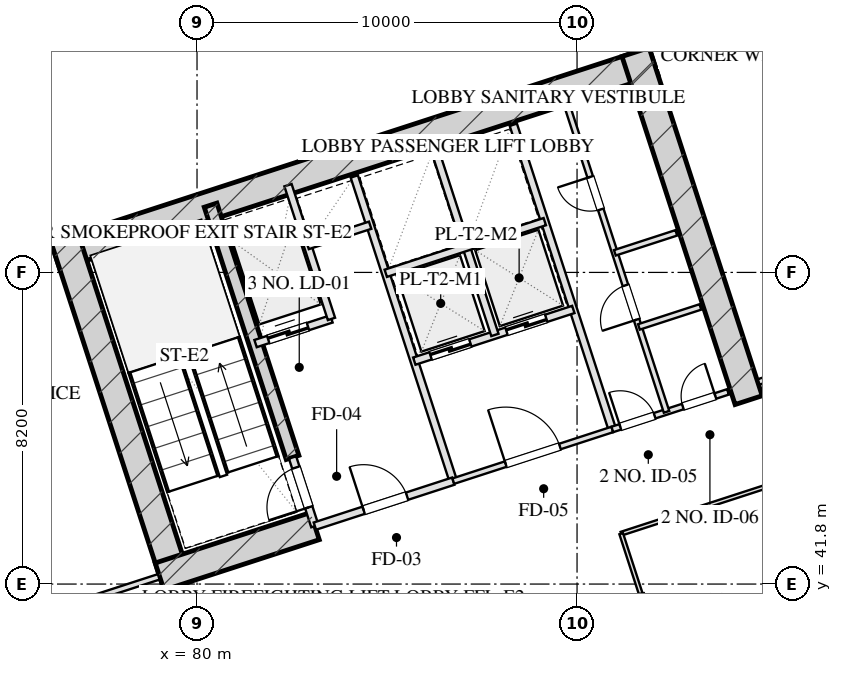
"""IFC4 building model, lengths in metres.
Left out: names, types, materials, properties, quantities, classifications, styles, units other than length and angle.
Written with IfcOpenShell. Run it as: python <this file> out.ifc"""

import sys

from ifc_helpers import new_model, si_unit, direction, frame, frame_2d, origin, place, context, subcontext, project, spatial, rectangle, extrude, element, fill, save


model = new_model("IFC4")
c1 = context("Model", 3, precision=1e-05, world=origin(), true_north=direction((0.0, 1.0)))
c2 = subcontext(c1, "Body", "Model", "MODEL_VIEW")
j1 = project(units=[si_unit("LENGTHUNIT", "METRE"), si_unit("PLANEANGLEUNIT", "RADIAN")], contexts=[c1])
p1 = place(None, origin())
s1 = spatial("IfcSite", under=j1, at=p1, CompositionType="ELEMENT")
p2 = place(p1, origin())
s2 = spatial("IfcBuilding", under=s1, at=p2, CompositionType="ELEMENT")
p3 = place(p2, frame((0.0, 0.0, 38.0)))
s3 = spatial("IfcBuildingStorey", under=s2, at=p3, CompositionType="ELEMENT", Elevation=38.0)
p4 = place(p3, frame((76.272, 50.443, 0.0), z_axis=(0.0, 0.0, 1.0), x_axis=(0.951056072937, 0.309018358888, 0.0)))
e1 = element("IfcWall", 1, at=p4, inside=s3, PredefinedType="SHEAR", context=c2, shape_type="SweptSolid", body=[
    extrude(rectangle(XDim=16.55, YDim=0.75, at=frame_2d((8.275, 0.0))), origin(), (0.0, 0.0, 1.0), 4.0),
])
for number, where, z_axis, x_axis in (
    (2, (79.489, 41.756, 0.0), (0.0, 0.0, 1.0), (-0.309, 0.951, 0.0)),
    (3, (94.515, 46.639, 0.0), (0.0, 0.0, 1.0), (-0.309, 0.951, 0.0)),
):
    element("IfcWall", number, at=place(p3, frame(where, z_axis=z_axis, x_axis=x_axis)), inside=s3, PredefinedType="SHEAR", context=c2, shape_type="SweptSolid", body=[
        extrude(rectangle(XDim=9.63, YDim=0.75, at=frame_2d((4.815, 0.0))), origin(), (0.0, 0.0, 1.0), 4.0),
    ])
p5 = place(p3, frame((82.514, 45.131, 0.0), z_axis=(0.0, 0.0, 1.0), x_axis=(-0.308988790936, 0.951065679686, 0.0)))
e4 = element("IfcWall", 4, at=p5, inside=s3, PredefinedType="SHEAR", context=c2, shape_type="SweptSolid", body=[
    extrude(rectangle(XDim=6.98, YDim=0.35, at=frame_2d((3.49, 0.0))), origin(), (0.0, 0.0, 1.0), 4.0),
])
p6 = place(p3, frame((79.016, 41.997, 0.0), z_axis=(0.0, 0.0, 1.0), x_axis=(0.95106038264, 0.309005094736, 0.0)))
e5 = element("IfcWall", 5, at=p6, inside=s3, PredefinedType="SHEAR", context=c2, shape_type="SweptSolid", body=[
    extrude(rectangle(XDim=4.295, YDim=0.75, at=frame_2d((2.147, 0.0))), origin(), (0.0, 0.0, 1.0), 4.0),
])
p7 = place(p3, frame((79.655, 4.352, 0.0), z_axis=(0.0, 0.0, 1.0), x_axis=(-0.309014526607, 0.951057318118, 0.0)))
e6 = element("IfcWall", 6, at=p7, inside=s3, PredefinedType="SOLIDWALL", context=c2, shape_type="SweptSolid", body=[
    extrude(rectangle(XDim=50.0, YDim=0.4, at=frame_2d((25.0, 0.0))), origin(), (0.0, 0.0, 1.0), 3.16),
])
p8 = place(p7, frame((21.85, 0.0, 0.0)))
e7 = element("IfcOpeningElement", 7, at=p8, cuts=e6, PredefinedType="OPENING", context=c2, shape_type="SweptSolid", body=[
    extrude(rectangle(XDim=1.1, YDim=2.15, at=frame_2d((0.55, 1.075))), frame((0.0, 0.21, 0.0), z_axis=(0.0, -1.0, 0.0), x_axis=(1.0, 0.0, 0.0)), (0.0, 0.0, 1.0), 0.42),
])
p9 = place(p3, frame((66.002, 55.433, 0.0), z_axis=(0.0, 0.0, 1.0), x_axis=(0.951055939317, 0.309018770125, 0.0)))
e8 = element("IfcWall", 8, at=p9, inside=s3, PredefinedType="SOLIDWALL", context=c2, shape_type="SweptSolid", body=[
    extrude(rectangle(XDim=32.4, YDim=0.4, at=frame_2d((16.2, 0.0))), origin(), (0.0, 0.0, 1.0), 3.16),
])
p10 = place(p3, frame((83.101, 43.324, 0.0), z_axis=(0.0, 0.0, 1.0), x_axis=(-0.309048298632, 0.951046344356, 0.0)))
e9 = element("IfcWall", 9, at=p10, inside=s3, PredefinedType="PARTITIONING", context=c2, shape_type="SweptSolid", body=[
    extrude(rectangle(XDim=1.9, YDim=0.2, at=frame_2d((0.95, 0.0))), origin(), (0.0, 0.0, 1.0), 3.725),
])
p11 = place(p10, frame((0.52, 0.0, 0.0)))
e10 = element("IfcOpeningElement", 10, at=p11, cuts=e9, PredefinedType="OPENING", context=c2, shape_type="SweptSolid", body=[
    extrude(rectangle(XDim=1.1, YDim=2.05, at=frame_2d((0.55, 1.025))), frame((0.0, 0.11, 0.0), z_axis=(0.0, -1.0, 0.0), x_axis=(1.0, 0.0, 0.0)), (0.0, 0.0, 1.0), 0.22),
])
p12 = place(p3, frame((86.743, 44.508, 0.0), z_axis=(0.0, 0.0, 1.0), x_axis=(-0.309016001439, 0.951056838919, 0.0)))
e11 = element("IfcWall", 11, at=p12, inside=s3, PredefinedType="PARTITIONING", context=c2, shape_type="SweptSolid", body=[
    extrude(rectangle(XDim=8.43, YDim=0.2, at=frame_2d((4.215, 0.0))), origin(), (0.0, 0.0, 1.0), 3.725),
])
p13 = place(p3, frame((83.101, 43.324, 0.0), z_axis=(0.0, 0.0, 1.0), x_axis=(0.951052804469, 0.309028417967, 0.0)))
e12 = element("IfcWall", 12, at=p13, inside=s3, PredefinedType="PARTITIONING", context=c2, shape_type="SweptSolid", body=[
    extrude(rectangle(XDim=3.83, YDim=0.2, at=frame_2d((1.915, 0.0))), origin(), (0.0, 0.0, 1.0), 3.725),
])
p14 = place(p13, frame((1.35, 0.0, 0.0)))
e13 = element("IfcOpeningElement", 13, at=p14, cuts=e12, PredefinedType="OPENING", context=c2, shape_type="SweptSolid", body=[
    extrude(rectangle(XDim=1.2, YDim=2.05, at=frame_2d((0.6, 1.025))), frame((0.0, 0.11, 0.0), z_axis=(0.0, -1.0, 0.0), x_axis=(1.0, 0.0, 0.0)), (0.0, 0.0, 1.0), 0.22),
])
p15 = place(p3, frame((81.54, 48.127, 0.0), z_axis=(0.0, 0.0, 1.0), x_axis=(0.951062257173, 0.308999325213, 0.0)))
e14 = element("IfcWall", 14, at=p15, inside=s3, PredefinedType="PARTITIONING", context=c2, shape_type="SweptSolid", body=[
    extrude(rectangle(XDim=2.1, YDim=0.2, at=frame_2d((1.05, 0.0))), origin(), (0.0, 0.0, 1.0), 3.725),
])
p16 = place(p15, frame((0.35, 0.0, 0.0)))
e15 = element("IfcOpeningElement", 15, at=p16, cuts=e14, PredefinedType="OPENING", context=c2, shape_type="SweptSolid", body=[
    extrude(rectangle(XDim=1.1, YDim=2.05, at=frame_2d((0.55, 1.025))), frame((0.0, 0.11, 0.0), z_axis=(0.0, -1.0, 0.0), x_axis=(1.0, 0.0, 0.0)), (0.0, 0.0, 1.0), 0.22),
])
p17 = place(p3, frame((83.538, 48.776, 0.0), z_axis=(0.0, 0.0, 1.0), x_axis=(-0.3089935693, 0.951064127245, 0.0)))
e16 = element("IfcWall", 16, at=p17, inside=s3, PredefinedType="PARTITIONING", context=c2, shape_type="SweptSolid", body=[
    extrude(rectangle(XDim=3.7, YDim=0.2, at=frame_2d((1.85, 0.0))), origin(), (0.0, 0.0, 1.0), 3.725),
])
p18 = place(p3, frame((82.91, 50.707, 0.0), z_axis=(0.0, 0.0, 1.0), x_axis=(0.951041328149, 0.309063734775, 0.0)))
e17 = element("IfcWall", 17, at=p18, inside=s3, PredefinedType="PARTITIONING", context=c2, shape_type="SweptSolid", body=[
    extrude(rectangle(XDim=1.73, YDim=0.2, at=frame_2d((0.865, 0.0))), origin(), (0.0, 0.0, 1.0), 3.725),
])
p19 = place(p3, frame((90.928, 45.868, 0.0), z_axis=(0.0, 0.0, 1.0), x_axis=(-0.309042196757, 0.951048327176, 0.0)))
e18 = element("IfcWall", 18, at=p19, inside=s3, PredefinedType="PARTITIONING", context=c2, shape_type="SweptSolid", body=[
    extrude(rectangle(XDim=8.43, YDim=0.2, at=frame_2d((4.215, 0.0))), origin(), (0.0, 0.0, 1.0), 3.725),
])
p20 = place(p3, frame((86.743, 44.508, 0.0), z_axis=(0.0, 0.0, 1.0), x_axis=(0.951063829732, 0.308994485023, 0.0)))
e19 = element("IfcWall", 19, at=p20, inside=s3, PredefinedType="PARTITIONING", context=c2, shape_type="SweptSolid", body=[
    extrude(rectangle(XDim=4.4, YDim=0.15, at=frame_2d((2.2, 0.0))), origin(), (0.0, 0.0, 1.0), 3.725),
])
p21 = place(p20, frame((1.45, 0.0, 0.0)))
e20 = element("IfcOpeningElement", 20, at=p21, cuts=e19, PredefinedType="OPENING", context=c2, shape_type="SweptSolid", body=[
    extrude(rectangle(XDim=1.5, YDim=2.05, at=frame_2d((0.75, 1.025))), frame((0.0, 0.085, 0.0), z_axis=(0.0, -1.0, 0.0), x_axis=(1.0, 0.0, 0.0)), (0.0, 0.0, 1.0), 0.17),
])
p22 = place(p3, frame((85.718, 47.666, 0.0), z_axis=(0.0, 0.0, 1.0), x_axis=(0.951058531764, 0.30901079133, 0.0)))
e21 = element("IfcWall", 21, at=p22, inside=s3, PredefinedType="PARTITIONING", context=c2, shape_type="SweptSolid", body=[
    extrude(rectangle(XDim=4.4, YDim=0.2, at=frame_2d((2.2, 0.0))), origin(), (0.0, 0.0, 1.0), 3.725),
])
p23 = place(p22, frame((0.45, 0.0, 0.0)))
e22 = element("IfcOpeningElement", 22, at=p23, cuts=e21, PredefinedType="OPENING", context=c2, shape_type="SweptSolid", body=[
    extrude(rectangle(XDim=1.1, YDim=2.05, at=frame_2d((0.55, 1.025))), frame((0.0, 0.11, 0.0), z_axis=(0.0, -1.0, 0.0), x_axis=(1.0, 0.0, 0.0)), (0.0, 0.0, 1.0), 0.22),
])
p24 = place(p22, frame((2.55, 0.0, 0.0)))
e23 = element("IfcOpeningElement", 23, at=p24, cuts=e21, PredefinedType="OPENING", context=c2, shape_type="SweptSolid", body=[
    extrude(rectangle(XDim=1.1, YDim=2.05, at=frame_2d((0.55, 1.025))), frame((0.0, 0.11, 0.0), z_axis=(0.0, -1.0, 0.0), x_axis=(1.0, 0.0, 0.0)), (0.0, 0.0, 1.0), 0.22),
])
p25 = place(p3, frame((87.838, 48.354, 0.0), z_axis=(0.0, 0.0, 1.0), x_axis=(-0.3090093719, 0.951058992953, 0.0)))
e24 = element("IfcWall", 24, at=p25, inside=s3, PredefinedType="PARTITIONING", context=c2, shape_type="SweptSolid", body=[
    extrude(rectangle(XDim=5.11, YDim=0.2, at=frame_2d((2.555, 0.0))), origin(), (0.0, 0.0, 1.0), 3.725),
])
p26 = place(p3, frame((84.967, 49.977, 0.0), z_axis=(0.0, 0.0, 1.0), x_axis=(0.951063829732, 0.308994485023, 0.0)))
e25 = element("IfcWall", 25, at=p26, inside=s3, PredefinedType="PARTITIONING", context=c2, shape_type="SweptSolid", body=[
    extrude(rectangle(XDim=4.4, YDim=0.2, at=frame_2d((2.2, 0.0))), origin(), (0.0, 0.0, 1.0), 3.725),
])
p27 = place(p3, frame((90.928, 45.868, 0.0), z_axis=(0.0, 0.0, 1.0), x_axis=(0.951059297078, 0.309008435874, 0.0)))
e26 = element("IfcWall", 26, at=p27, inside=s3, PredefinedType="PARTITIONING", context=c2, shape_type="SweptSolid", body=[
    extrude(rectangle(XDim=3.2, YDim=0.15, at=frame_2d((1.6, 0.0))), origin(), (0.0, 0.0, 1.0), 3.725),
])
p28 = place(p27, frame((0.22, 0.0, 0.0)))
e27 = element("IfcOpeningElement", 27, at=p28, cuts=e26, PredefinedType="OPENING", context=c2, shape_type="SweptSolid", body=[
    extrude(rectangle(XDim=0.95, YDim=2.05, at=frame_2d((0.475, 1.025))), frame((0.0, 0.085, 0.0), z_axis=(0.0, -1.0, 0.0), x_axis=(1.0, 0.0, 0.0)), (0.0, 0.0, 1.0), 0.17),
])
p29 = place(p27, frame((1.95, 0.0, 0.0)))
e28 = element("IfcOpeningElement", 28, at=p29, cuts=e26, PredefinedType="OPENING", context=c2, shape_type="SweptSolid", body=[
    extrude(rectangle(XDim=0.9, YDim=2.05, at=frame_2d((0.45, 1.025))), frame((0.0, 0.085, 0.0), z_axis=(0.0, -1.0, 0.0), x_axis=(1.0, 0.0, 0.0)), (0.0, 0.0, 1.0), 0.17),
])
p30 = place(p3, frame((92.355, 46.331, 0.0), z_axis=(0.0, 0.0, 1.0), x_axis=(-0.309007490203, 0.951059604335, 0.0)))
e29 = element("IfcWall", 29, at=p30, inside=s3, PredefinedType="PARTITIONING", context=c2, shape_type="SweptSolid", body=[
    extrude(rectangle(XDim=8.43, YDim=0.15, at=frame_2d((4.215, 0.0))), origin(), (0.0, 0.0, 1.0), 3.725),
])
p31 = place(p30, frame((2.55, 0.0, 0.0)))
e30 = element("IfcOpeningElement", 30, at=p31, cuts=e29, PredefinedType="OPENING", context=c2, shape_type="SweptSolid", body=[
    extrude(rectangle(XDim=0.95, YDim=2.05, at=frame_2d((0.475, 1.025))), frame((0.0, 0.085, 0.0), z_axis=(0.0, -1.0, 0.0), x_axis=(1.0, 0.0, 0.0)), (0.0, 0.0, 1.0), 0.17),
])
p32 = place(p30, frame((5.6, 0.0, 0.0)))
e31 = element("IfcOpeningElement", 31, at=p32, cuts=e29, PredefinedType="OPENING", context=c2, shape_type="SweptSolid", body=[
    extrude(rectangle(XDim=0.9, YDim=2.05, at=frame_2d((0.45, 1.025))), frame((0.0, 0.085, 0.0), z_axis=(0.0, -1.0, 0.0), x_axis=(1.0, 0.0, 0.0)), (0.0, 0.0, 1.0), 0.17),
])
p33 = place(p3, frame((90.995, 50.516, 0.0), z_axis=(0.0, 0.0, 1.0), x_axis=(0.951040401051, 0.309066587596, 0.0)))
e32 = element("IfcWall", 32, at=p33, inside=s3, PredefinedType="PARTITIONING", context=c2, shape_type="SweptSolid", body=[
    extrude(rectangle(XDim=1.7, YDim=0.15, at=frame_2d((0.85, 0.0))), origin(), (0.0, 0.0, 1.0), 3.725),
])
p34 = place(p3, frame((91.628, 48.566, 0.0), z_axis=(0.0, 0.0, 1.0), x_axis=(0.951054116971, 0.309024378638, 0.0)))
e33 = element("IfcWall", 33, at=p34, inside=s3, PredefinedType="PARTITIONING", context=c2, shape_type="SweptSolid", body=[
    extrude(rectangle(XDim=1.7, YDim=0.15, at=frame_2d((0.85, 0.0))), origin(), (0.0, 0.0, 1.0), 3.725),
])
p35 = place(p3, frame((68.721, 38.652, 0.0), z_axis=(0.0, 0.0, 1.0), x_axis=(0.951056658866, 0.309016555588, 0.0)))
e34 = element("IfcWall", 34, at=p35, inside=s3, PredefinedType="PARTITIONING", context=c2, shape_type="SweptSolid", body=[
    extrude(rectangle(XDim=10.8, YDim=0.15, at=frame_2d((5.4, 0.0))), origin(), (0.0, 0.0, 1.0), 3.725),
])
p36 = place(p35, frame((4.536, 0.0, 0.0)))
e35 = element("IfcOpeningElement", 35, at=p36, cuts=e34, PredefinedType="OPENING", context=c2, shape_type="SweptSolid", body=[
    extrude(rectangle(XDim=0.85, YDim=2.05, at=frame_2d((0.425, 1.025))), frame((0.0, 0.085, 0.0), z_axis=(0.0, -1.0, 0.0), x_axis=(1.0, 0.0, 0.0)), (0.0, 0.0, 1.0), 0.17),
])
p37 = place(p3, frame((94.78, 47.119, 0.0), z_axis=(0.0, 0.0, 1.0), x_axis=(0.951054294345, 0.309023832749, 0.0)))
e36 = element("IfcWall", 36, at=p37, inside=s3, PredefinedType="PARTITIONING", context=c2, shape_type="SweptSolid", body=[
    extrude(rectangle(XDim=10.2, YDim=0.15, at=frame_2d((5.1, 0.0))), origin(), (0.0, 0.0, 1.0), 3.725),
])
p38 = place(p37, frame((4.284, 0.0, 0.0)))
e37 = element("IfcOpeningElement", 37, at=p38, cuts=e36, PredefinedType="OPENING", context=c2, shape_type="SweptSolid", body=[
    extrude(rectangle(XDim=1.0, YDim=2.05, at=frame_2d((0.5, 1.025))), frame((0.0, 0.085, 0.0), z_axis=(0.0, -1.0, 0.0), x_axis=(1.0, 0.0, 0.0)), (0.0, 0.0, 1.0), 0.17),
])
p39 = place(p3, frame((69.549, 36.103, 0.0), z_axis=(0.0, 0.0, 1.0), x_axis=(0.951057491432, 0.309013993197, 0.0)))
e38 = element("IfcWall", 38, at=p39, inside=s3, PredefinedType="MOVABLE", context=c2, shape_type="SweptSolid", body=[
    extrude(rectangle(XDim=18.075, YDim=0.1, at=frame_2d((9.038, 0.0))), origin(), (0.0, 0.0, 1.0), 3.725),
])
p40 = place(p3, frame((91.162, 43.126, 0.0), z_axis=(0.0, 0.0, 1.0), x_axis=(0.951055535739, 0.309020012199, 0.0)))
e39 = element("IfcWall", 39, at=p40, inside=s3, PredefinedType="MOVABLE", context=c2, shape_type="SweptSolid", body=[
    extrude(rectangle(XDim=14.875, YDim=0.1, at=frame_2d((7.438, 0.0))), origin(), (0.0, 0.0, 1.0), 3.725),
])
p41 = place(p3, frame((91.882, 25.863, 0.0), z_axis=(0.0, 0.0, 1.0), x_axis=(-0.309022042254, 0.951054876125, 0.0)))
e40 = element("IfcWall", 40, at=p41, inside=s3, PredefinedType="MOVABLE", context=c2, shape_type="SweptSolid", body=[
    extrude(rectangle(XDim=16.64, YDim=0.1, at=frame_2d((8.32, 0.0))), origin(), (0.0, 0.0, 1.0), 3.725),
])
p42 = place(p41, frame((1.16, 0.0, 0.0)))
e41 = element("IfcOpeningElement", 41, at=p42, cuts=e40, PredefinedType="OPENING", context=c2, shape_type="SweptSolid", body=[
    extrude(rectangle(XDim=1.0, YDim=2.05, at=frame_2d((0.5, 1.025))), frame((0.0, 0.06, 0.0), z_axis=(0.0, -1.0, 0.0), x_axis=(1.0, 0.0, 0.0)), (0.0, 0.0, 1.0), 0.12),
])
p43 = place(p41, frame((6.16, 0.0, 0.0)))
e42 = element("IfcOpeningElement", 42, at=p43, cuts=e40, PredefinedType="OPENING", context=c2, shape_type="SweptSolid", body=[
    extrude(rectangle(XDim=1.0, YDim=2.05, at=frame_2d((0.5, 1.025))), frame((0.0, 0.06, 0.0), z_axis=(0.0, -1.0, 0.0), x_axis=(1.0, 0.0, 0.0)), (0.0, 0.0, 1.0), 0.12),
])
p44 = place(p41, frame((10.16, 0.0, 0.0)))
e43 = element("IfcOpeningElement", 43, at=p44, cuts=e40, PredefinedType="OPENING", context=c2, shape_type="SweptSolid", body=[
    extrude(rectangle(XDim=1.0, YDim=2.05, at=frame_2d((0.5, 1.025))), frame((0.0, 0.06, 0.0), z_axis=(0.0, -1.0, 0.0), x_axis=(1.0, 0.0, 0.0)), (0.0, 0.0, 1.0), 0.12),
])
p45 = place(p41, frame((14.48, 0.0, 0.0)))
e44 = element("IfcOpeningElement", 44, at=p45, cuts=e40, PredefinedType="OPENING", context=c2, shape_type="SweptSolid", body=[
    extrude(rectangle(XDim=1.05, YDim=2.05, at=frame_2d((0.525, 1.025))), frame((0.0, 0.06, 0.0), z_axis=(0.0, -1.0, 0.0), x_axis=(1.0, 0.0, 0.0)), (0.0, 0.0, 1.0), 0.12),
])
p46 = place(p3, frame((96.304, 27.3, 0.0), z_axis=(0.0, 0.0, 1.0), x_axis=(-0.30901773025, 0.951056277195, 0.0)))
e45 = element("IfcWall", 45, at=p46, inside=s3, PredefinedType="MOVABLE", context=c2, shape_type="SweptSolid", body=[
    extrude(rectangle(XDim=16.64, YDim=0.1, at=frame_2d((8.32, 0.0))), origin(), (0.0, 0.0, 1.0), 3.725),
])
p47 = place(p46, frame((1.66, 0.0, 0.0)))
e46 = element("IfcOpeningElement", 46, at=p47, cuts=e45, PredefinedType="OPENING", context=c2, shape_type="SweptSolid", body=[
    extrude(rectangle(XDim=1.0, YDim=2.05, at=frame_2d((0.5, 1.025))), frame((0.0, 0.06, 0.0), z_axis=(0.0, -1.0, 0.0), x_axis=(1.0, 0.0, 0.0)), (0.0, 0.0, 1.0), 0.12),
])
p48 = place(p46, frame((7.82, 0.0, 0.0)))
e47 = element("IfcOpeningElement", 47, at=p48, cuts=e45, PredefinedType="OPENING", context=c2, shape_type="SweptSolid", body=[
    extrude(rectangle(XDim=1.0, YDim=2.05, at=frame_2d((0.5, 1.025))), frame((0.0, 0.06, 0.0), z_axis=(0.0, -1.0, 0.0), x_axis=(1.0, 0.0, 0.0)), (0.0, 0.0, 1.0), 0.12),
])
p49 = place(p46, frame((13.98, 0.0, 0.0)))
e48 = element("IfcOpeningElement", 48, at=p49, cuts=e45, PredefinedType="OPENING", context=c2, shape_type="SweptSolid", body=[
    extrude(rectangle(XDim=1.0, YDim=2.05, at=frame_2d((0.5, 1.025))), frame((0.0, 0.06, 0.0), z_axis=(0.0, -1.0, 0.0), x_axis=(1.0, 0.0, 0.0)), (0.0, 0.0, 1.0), 0.12),
])
p50 = place(p3, frame((92.497, 39.017, 0.0), z_axis=(0.0, 0.0, 1.0), x_axis=(0.951055535739, 0.309020012199, 0.0)))
e49 = element("IfcWall", 49, at=p50, inside=s3, PredefinedType="MOVABLE", context=c2, shape_type="SweptSolid", body=[
    extrude(rectangle(XDim=14.875, YDim=0.1, at=frame_2d((7.438, 0.0))), origin(), (0.0, 0.0, 1.0), 3.725),
])
p51 = place(p11, origin())
e50 = element("IfcDoor", 50, at=p51, inside=s3, OperationType="SINGLE_SWING_LEFT", PredefinedType="DOOR", context=c2, shape_type="SweptSolid", body=[
    extrude(rectangle(XDim=1.1, YDim=2.05, at=frame_2d((0.55, 1.025))), frame((0.0, 0.025, 0.0), z_axis=(0.0, -1.0, 0.0), x_axis=(1.0, 0.0, 0.0)), (0.0, 0.0, 1.0), 0.05),
])
fill(e10, e50)
p52 = place(p14, origin())
e51 = element("IfcDoor", 51, at=p52, inside=s3, OperationType="SINGLE_SWING_LEFT", PredefinedType="DOOR", context=c2, shape_type="SweptSolid", body=[
    extrude(rectangle(XDim=1.2, YDim=2.05, at=frame_2d((0.6, 1.025))), frame((0.0, 0.025, 0.0), z_axis=(0.0, -1.0, 0.0), x_axis=(1.0, 0.0, 0.0)), (0.0, 0.0, 1.0), 0.05),
])
fill(e13, e51)
p53 = place(p16, origin())
e52 = element("IfcDoor", 52, at=p53, inside=s3, OperationType="DOUBLE_DOOR_SLIDING", PredefinedType="DOOR", context=c2, shape_type="SweptSolid", body=[
    extrude(rectangle(XDim=1.1, YDim=2.05, at=frame_2d((0.55, 1.025))), frame((0.0, 0.025, 0.0), z_axis=(0.0, -1.0, 0.0), x_axis=(1.0, 0.0, 0.0)), (0.0, 0.0, 1.0), 0.05),
])
fill(e15, e52)
p54 = place(p21, origin())
e53 = element("IfcDoor", 53, at=p54, inside=s3, OperationType="SINGLE_SWING_LEFT", PredefinedType="DOOR", context=c2, shape_type="SweptSolid", body=[
    extrude(rectangle(XDim=1.5, YDim=2.05, at=frame_2d((0.75, 1.025))), frame((0.0, 0.025, 0.0), z_axis=(0.0, -1.0, 0.0), x_axis=(1.0, 0.0, 0.0)), (0.0, 0.0, 1.0), 0.05),
])
fill(e20, e53)
p55 = place(p23, origin())
e54 = element("IfcDoor", 54, at=p55, inside=s3, OperationType="DOUBLE_DOOR_SLIDING", PredefinedType="DOOR", context=c2, shape_type="SweptSolid", body=[
    extrude(rectangle(XDim=1.1, YDim=2.05, at=frame_2d((0.55, 1.025))), frame((0.0, 0.025, 0.0), z_axis=(0.0, -1.0, 0.0), x_axis=(1.0, 0.0, 0.0)), (0.0, 0.0, 1.0), 0.05),
])
fill(e22, e54)
p56 = place(p24, origin())
e55 = element("IfcDoor", 55, at=p56, inside=s3, OperationType="DOUBLE_DOOR_SLIDING", PredefinedType="DOOR", context=c2, shape_type="SweptSolid", body=[
    extrude(rectangle(XDim=1.1, YDim=2.05, at=frame_2d((0.55, 1.025))), frame((0.0, 0.025, 0.0), z_axis=(0.0, -1.0, 0.0), x_axis=(1.0, 0.0, 0.0)), (0.0, 0.0, 1.0), 0.05),
])
fill(e23, e55)
p57 = place(p28, origin())
e56 = element("IfcDoor", 56, at=p57, inside=s3, OperationType="SINGLE_SWING_LEFT", PredefinedType="DOOR", context=c2, shape_type="SweptSolid", body=[
    extrude(rectangle(XDim=0.95, YDim=2.05, at=frame_2d((0.475, 1.025))), frame((0.0, 0.025, 0.0), z_axis=(0.0, -1.0, 0.0), x_axis=(1.0, 0.0, 0.0)), (0.0, 0.0, 1.0), 0.05),
])
fill(e27, e56)
p58 = place(p29, origin())
e57 = element("IfcDoor", 57, at=p58, inside=s3, OperationType="SINGLE_SWING_RIGHT", PredefinedType="DOOR", context=c2, shape_type="SweptSolid", body=[
    extrude(rectangle(XDim=0.9, YDim=2.05, at=frame_2d((0.45, 1.025))), frame((0.0, 0.025, 0.0), z_axis=(0.0, -1.0, 0.0), x_axis=(1.0, 0.0, 0.0)), (0.0, 0.0, 1.0), 0.05),
])
fill(e28, e57)
p59 = place(p31, origin())
e58 = element("IfcDoor", 58, at=p59, inside=s3, OperationType="SINGLE_SWING_LEFT", PredefinedType="DOOR", context=c2, shape_type="SweptSolid", body=[
    extrude(rectangle(XDim=0.95, YDim=2.05, at=frame_2d((0.475, 1.025))), frame((0.0, 0.025, 0.0), z_axis=(0.0, -1.0, 0.0), x_axis=(1.0, 0.0, 0.0)), (0.0, 0.0, 1.0), 0.05),
])
fill(e30, e58)
p60 = place(p32, origin())
e59 = element("IfcDoor", 59, at=p60, inside=s3, OperationType="SINGLE_SWING_RIGHT", PredefinedType="DOOR", context=c2, shape_type="SweptSolid", body=[
    extrude(rectangle(XDim=0.9, YDim=2.05, at=frame_2d((0.45, 1.025))), frame((0.0, 0.025, 0.0), z_axis=(0.0, -1.0, 0.0), x_axis=(1.0, 0.0, 0.0)), (0.0, 0.0, 1.0), 0.05),
])
fill(e31, e59)
p61 = place(p49, origin())
e60 = element("IfcDoor", 60, at=p61, inside=s3, OperationType="SINGLE_SWING_RIGHT", PredefinedType="DOOR", context=c2, shape_type="SweptSolid", body=[
    extrude(rectangle(XDim=1.0, YDim=2.05, at=frame_2d((0.5, 1.025))), frame((0.0, 0.025, 0.0), z_axis=(0.0, -1.0, 0.0), x_axis=(1.0, 0.0, 0.0)), (0.0, 0.0, 1.0), 0.05),
])
fill(e48, e60)
save(model, sys.argv[1])
